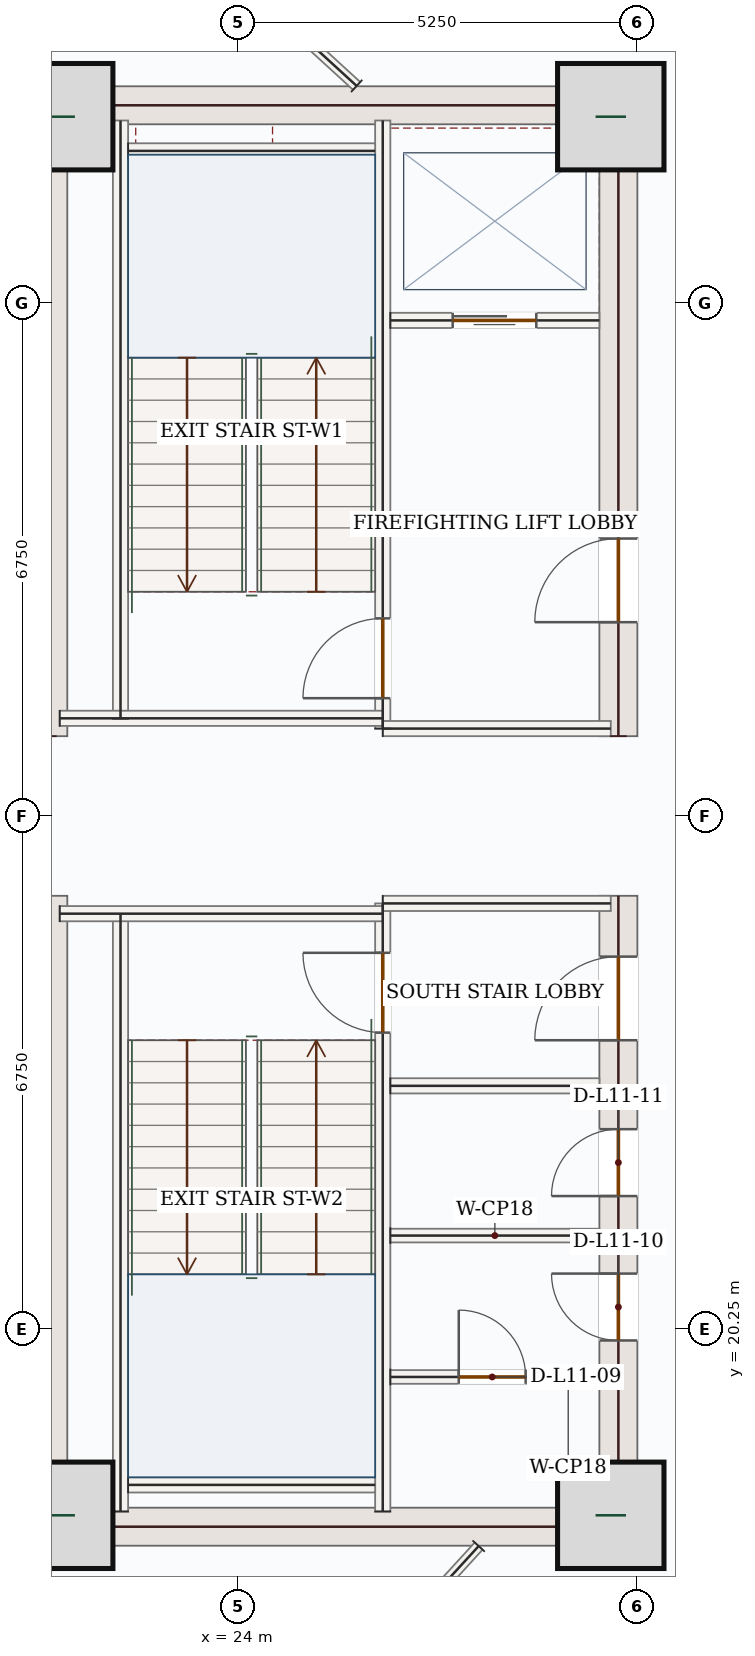
"""IFC4 building model, lengths in metres.
Left out: names, types, materials, properties, quantities, classifications, styles, units other than length and angle.
Written with IfcOpenShell. Run it as: python <this file> out.ifc"""

import sys

from ifc_helpers import new_model, si_unit, direction, frame, frame_2d, origin, origin_2d, place, context, subcontext, project, spatial, rectangle, extrude, source, transform, mapped, element, fill, save


model = new_model("IFC4")
c1 = context("Model", 3, precision=1e-05, world=origin(), true_north=direction((0.0, 1.0)))
c2 = subcontext(c1, "Body", "Model", "MODEL_VIEW")
j1 = project(units=[si_unit("LENGTHUNIT", "METRE"), si_unit("PLANEANGLEUNIT", "RADIAN")], contexts=[c1])
p1 = place(None, origin())
s1 = spatial("IfcSite", under=j1, at=p1, CompositionType="ELEMENT")
p2 = place(p1, origin())
s2 = spatial("IfcBuilding", under=s1, at=p2, CompositionType="ELEMENT")
p3 = place(p2, frame((0.0, 0.0, 54.3)))
s3 = spatial("IfcBuildingStorey", under=s2, at=p3, CompositionType="ELEMENT", Elevation=54.3)
m1 = source(origin(), c2, "Body", "SweptSolid", [
    extrude(rectangle(XDim=8.55, YDim=0.5, at=frame_2d((4.275, 0.0))), origin(), (0.0, 0.0, 1.0), 3.95),
])
for number, where, z_axis, x_axis in (
    (1, (21.5, 17.4, 0.0), (0.0, 0.0, 1.0), (0.0, 1.0, 0.0)),
    (2, (21.5, 28.05, 0.0), (0.0, 0.0, 1.0), (0.0, 1.0, 0.0)),
):
    element("IfcWall", number, at=place(p3, frame(where, z_axis=z_axis, x_axis=x_axis)), inside=s3, PredefinedType="SHEAR", context=c2, shape_type="MappedRepresentation", body=[
        mapped(m1, transform((0.0, 0.0, 0.0), x_axis=(1.0, 0.0, 0.0), y_axis=(0.0, 1.0, 0.0), z_axis=(0.0, 0.0, 1.0), scale=1.0)),
    ])
p4 = place(p3, frame((29.0, 17.4, 0.0), z_axis=(0.0, 0.0, 1.0), x_axis=(0.0, 1.0, 0.0)))
e3 = element("IfcWall", 3, at=p4, inside=s3, PredefinedType="SHEAR", context=c2, shape_type="SweptSolid", body=[
    extrude(rectangle(XDim=8.55, YDim=0.5, at=frame_2d((4.275, 0.0))), origin(), (0.0, 0.0, 1.0), 3.95),
])
p5 = place(p4, frame((6.65, 0.0, 0.0)))
e4 = element("IfcOpeningElement", 4, at=p5, cuts=e3, PredefinedType="OPENING", context=c2, shape_type="SweptSolid", body=[
    extrude(rectangle(XDim=1.1, YDim=2.2, at=frame_2d((0.55, 1.1))), frame((0.0, 0.26, 0.0), z_axis=(0.0, -1.0, 0.0), x_axis=(1.0, 0.0, 0.0)), (0.0, 0.0, 1.0), 0.52),
])
p6 = place(p4, frame((2.7, 0.0, 0.0)))
e5 = element("IfcOpeningElement", 5, at=p6, cuts=e3, PredefinedType="OPENING", context=c2, shape_type="SweptSolid", body=[
    extrude(rectangle(XDim=0.88, YDim=2.1, at=frame_2d((0.44, 1.05))), frame((0.0, 0.26, 0.0), z_axis=(0.0, -1.0, 0.0), x_axis=(1.0, 0.0, 0.0)), (0.0, 0.0, 1.0), 0.52),
])
p7 = place(p4, frame((4.6, 0.0, 0.0)))
e6 = element("IfcOpeningElement", 6, at=p7, cuts=e3, PredefinedType="OPENING", context=c2, shape_type="SweptSolid", body=[
    extrude(rectangle(XDim=0.88, YDim=2.1, at=frame_2d((0.44, 1.05))), frame((0.0, 0.26, 0.0), z_axis=(0.0, -1.0, 0.0), x_axis=(1.0, 0.0, 0.0)), (0.0, 0.0, 1.0), 0.52),
])
p8 = place(p3, frame((29.0, 28.05, 0.0), z_axis=(0.0, 0.0, 1.0), x_axis=(0.0, 1.0, 0.0)))
e7 = element("IfcWall", 7, at=p8, inside=s3, PredefinedType="SHEAR", context=c2, shape_type="SweptSolid", body=[
    extrude(rectangle(XDim=8.55, YDim=0.5, at=frame_2d((4.275, 0.0))), origin(), (0.0, 0.0, 1.0), 3.95),
])
p9 = place(p8, frame((1.5, 0.0, 0.0)))
e8 = element("IfcOpeningElement", 8, at=p9, cuts=e7, PredefinedType="OPENING", context=c2, shape_type="SweptSolid", body=[
    extrude(rectangle(XDim=1.1, YDim=2.2, at=frame_2d((0.55, 1.1))), frame((0.0, 0.26, 0.0), z_axis=(0.0, -1.0, 0.0), x_axis=(1.0, 0.0, 0.0)), (0.0, 0.0, 1.0), 0.52),
])
m2 = source(origin(), c2, "Body", "SweptSolid", [
    extrude(rectangle(XDim=7.0, YDim=0.5, at=frame_2d((3.5, 0.0))), origin(), (0.0, 0.0, 1.0), 3.95),
])
for number, where, z_axis, x_axis in (
    (9, (21.75, 17.65, 0.0), (0.0, 0.0, 1.0), (1.0, 0.0, 0.0)),
    (10, (21.75, 36.35, 0.0), (0.0, 0.0, 1.0), (1.0, 0.0, 0.0)),
):
    element("IfcWall", number, at=place(p3, frame(where, z_axis=z_axis, x_axis=x_axis)), inside=s3, PredefinedType="SHEAR", context=c2, shape_type="MappedRepresentation", body=[
        mapped(m2, transform((0.0, 0.0, 0.0), x_axis=(1.0, 0.0, 0.0), y_axis=(0.0, 1.0, 0.0), z_axis=(0.0, 0.0, 1.0), scale=1.0)),
    ])
m3 = source(origin(), c2, "Body", "SweptSolid", [
    extrude(rectangle(XDim=1.4, YDim=1.4, at=origin_2d()), origin(), (0.0, 0.0, 1.0), 4.2),
])
for number, where, z_axis, x_axis in (
    (11, (21.65, 17.8, 0.0), (0.0, 0.0, 1.0), (1.0, 0.0, 0.0)),
    (12, (28.9, 17.8, 0.0), (0.0, 0.0, 1.0), (1.0, 0.0, 0.0)),
    (13, (21.65, 36.2, 0.0), (0.0, 0.0, 1.0), (1.0, 0.0, 0.0)),
    (14, (28.9, 36.2, 0.0), (0.0, 0.0, 1.0), (1.0, 0.0, 0.0)),
):
    element("IfcColumn", number, at=place(p3, frame(where, z_axis=z_axis, x_axis=x_axis)), inside=s3, PredefinedType="COLUMN", context=c2, shape_type="MappedRepresentation", body=[
        mapped(m3, transform((0.0, 0.0, 0.0), x_axis=(1.0, 0.0, 0.0), y_axis=(0.0, 1.0, 0.0), z_axis=(0.0, 0.0, 1.0), scale=1.0)),
    ])
p10 = place(p3, frame((22.658, 14.74, 0.0), z_axis=(0.0, 0.0, 1.0), x_axis=(-0.707106781187, 0.707106781187, 0.0)))
e15 = element("IfcWall", 15, at=p10, inside=s3, PredefinedType="SOLIDWALL", context=c2, shape_type="SweptSolid", body=[
    extrude(rectangle(XDim=5.258, YDim=0.32, at=frame_2d((2.629, 0.0))), origin(), (0.0, 0.0, 1.0), 3.95),
])
p11 = place(p10, frame((1.429, 0.0, 0.85)))
e16 = element("IfcOpeningElement", 16, at=p11, cuts=e15, PredefinedType="OPENING", context=c2, shape_type="SweptSolid", body=[
    extrude(rectangle(XDim=2.4, YDim=1.8, at=frame_2d((1.2, 0.9))), frame((0.0, 0.17, 0.0), z_axis=(0.0, -1.0, 0.0), x_axis=(1.0, 0.0, 0.0)), (0.0, 0.0, 1.0), 0.34),
])
m4 = source(origin(), c2, "Body", "SweptSolid", [
    extrude(rectangle(XDim=5.258, YDim=0.32, at=frame_2d((2.629, 0.0))), origin(), (0.0, 0.0, 1.0), 3.95),
])
p12 = place(p3, frame((18.94, 35.542, 0.0), z_axis=(0.0, 0.0, 1.0), x_axis=(0.707106781187, 0.707106781187, 0.0)))
e17 = element("IfcWall", 17, at=p12, inside=s3, PredefinedType="SOLIDWALL", context=c2, shape_type="MappedRepresentation", body=[
    mapped(m4, transform((0.0, 0.0, 0.0), x_axis=(1.0, 0.0, 0.0), y_axis=(0.0, 1.0, 0.0), z_axis=(0.0, 0.0, 1.0), scale=1.0)),
])
m5 = source(origin(), c2, "Body", "SweptSolid", [
    extrude(rectangle(XDim=7.87, YDim=0.2, at=frame_2d((3.935, 0.0))), origin(), (0.0, 0.0, 1.0), 3.95),
])
for number, where, z_axis, x_axis in (
    (18, (22.45, 17.85, 0.0), (0.0, 0.0, 1.0), (0.0, 1.0, 0.0)),
    (19, (22.45, 28.28, 0.0), (0.0, 0.0, 1.0), (0.0, 1.0, 0.0)),
):
    element("IfcWall", number, at=place(p3, frame(where, z_axis=z_axis, x_axis=x_axis)), inside=s3, PredefinedType="SOLIDWALL", context=c2, shape_type="MappedRepresentation", body=[
        mapped(m5, transform((0.0, 0.0, 0.0), x_axis=(1.0, 0.0, 0.0), y_axis=(0.0, 1.0, 0.0), z_axis=(0.0, 0.0, 1.0), scale=1.0)),
    ])
p13 = place(p3, frame((25.9, 17.85, 0.0), z_axis=(0.0, 0.0, 1.0), x_axis=(0.0, 1.0, 0.0)))
e20 = element("IfcWall", 20, at=p13, inside=s3, PredefinedType="SOLIDWALL", context=c2, shape_type="SweptSolid", body=[
    extrude(rectangle(XDim=8.0, YDim=0.2, at=frame_2d((4.0, 0.0))), origin(), (0.0, 0.0, 1.0), 3.95),
])
p14 = place(p13, frame((6.3, 0.0, 0.0)))
e21 = element("IfcOpeningElement", 21, at=p14, cuts=e20, PredefinedType="OPENING", context=c2, shape_type="SweptSolid", body=[
    extrude(rectangle(XDim=1.05, YDim=2.15, at=frame_2d((0.525, 1.075))), frame((0.0, 0.11, 0.0), z_axis=(0.0, -1.0, 0.0), x_axis=(1.0, 0.0, 0.0)), (0.0, 0.0, 1.0), 0.22),
])
p15 = place(p3, frame((25.9, 28.15, 0.0), z_axis=(0.0, 0.0, 1.0), x_axis=(0.0, 1.0, 0.0)))
e22 = element("IfcWall", 22, at=p15, inside=s3, PredefinedType="SOLIDWALL", context=c2, shape_type="SweptSolid", body=[
    extrude(rectangle(XDim=8.0, YDim=0.2, at=frame_2d((4.0, 0.0))), origin(), (0.0, 0.0, 1.0), 3.95),
])
p16 = place(p15, frame((0.4, 0.0, 0.0)))
e23 = element("IfcOpeningElement", 23, at=p16, cuts=e22, PredefinedType="OPENING", context=c2, shape_type="SweptSolid", body=[
    extrude(rectangle(XDim=1.05, YDim=2.15, at=frame_2d((0.525, 1.075))), frame((0.0, 0.11, 0.0), z_axis=(0.0, -1.0, 0.0), x_axis=(1.0, 0.0, 0.0)), (0.0, 0.0, 1.0), 0.22),
])
m6 = source(origin(), c2, "Body", "SweptSolid", [
    extrude(rectangle(XDim=4.25, YDim=0.2, at=frame_2d((2.125, 0.0))), origin(), (0.0, 0.0, 1.0), 3.95),
])
p17 = place(p3, frame((21.65, 25.715, 0.0), z_axis=(0.0, 0.0, 1.0), x_axis=(1.0, 0.0, 0.0)))
e24 = element("IfcWall", 24, at=p17, inside=s3, PredefinedType="SOLIDWALL", context=c2, shape_type="MappedRepresentation", body=[
    mapped(m6, transform((0.0, 0.0, 0.0), x_axis=(1.0, 0.0, 0.0), y_axis=(0.0, 1.0, 0.0), z_axis=(0.0, 0.0, 1.0), scale=1.0)),
])
m7 = source(origin(), c2, "Body", "SweptSolid", [
    extrude(rectangle(XDim=3.0, YDim=0.2, at=frame_2d((1.5, 0.0))), origin(), (0.0, 0.0, 1.0), 3.95),
])
p18 = place(p3, frame((25.9, 25.85, 0.0), z_axis=(0.0, 0.0, 1.0), x_axis=(1.0, 0.0, 0.0)))
e25 = element("IfcWall", 25, at=p18, inside=s3, PredefinedType="SOLIDWALL", context=c2, shape_type="MappedRepresentation", body=[
    mapped(m7, transform((0.0, 0.0, 0.0), x_axis=(1.0, 0.0, 0.0), y_axis=(0.0, 1.0, 0.0), z_axis=(0.0, 0.0, 1.0), scale=1.0)),
])
p19 = place(p3, frame((21.65, 28.285, 0.0), z_axis=(0.0, 0.0, 1.0), x_axis=(1.0, 0.0, 0.0)))
e26 = element("IfcWall", 26, at=p19, inside=s3, PredefinedType="SOLIDWALL", context=c2, shape_type="MappedRepresentation", body=[
    mapped(m6, transform((0.0, 0.0, 0.0), x_axis=(1.0, 0.0, 0.0), y_axis=(0.0, 1.0, 0.0), z_axis=(0.0, 0.0, 1.0), scale=1.0)),
])
p20 = place(p3, frame((25.9, 28.15, 0.0), z_axis=(0.0, 0.0, 1.0), x_axis=(1.0, 0.0, 0.0)))
e27 = element("IfcWall", 27, at=p20, inside=s3, PredefinedType="SOLIDWALL", context=c2, shape_type="MappedRepresentation", body=[
    mapped(m7, transform((0.0, 0.0, 0.0), x_axis=(1.0, 0.0, 0.0), y_axis=(0.0, 1.0, 0.0), z_axis=(0.0, 0.0, 1.0), scale=1.0)),
])
m8 = source(origin(), c2, "Body", "SweptSolid", [
    extrude(rectangle(XDim=3.25, YDim=0.2, at=frame_2d((1.625, 0.0))), origin(), (0.0, 0.0, 1.0), 3.95),
])
for number, where, z_axis, x_axis in (
    (28, (22.55, 35.75, 0.0), (0.0, 0.0, 1.0), (1.0, 0.0, 0.0)),
    (29, (22.55, 18.2, 0.0), (0.0, 0.0, 1.0), (1.0, 0.0, 0.0)),
):
    element("IfcWall", number, at=place(p3, frame(where, z_axis=z_axis, x_axis=x_axis)), inside=s3, PredefinedType="SOLIDWALL", context=c2, shape_type="MappedRepresentation", body=[
        mapped(m8, transform((0.0, 0.0, 0.0), x_axis=(1.0, 0.0, 0.0), y_axis=(0.0, 1.0, 0.0), z_axis=(0.0, 0.0, 1.0), scale=1.0)),
    ])
p21 = place(p3, frame((26.0, 33.52, 0.0), z_axis=(0.0, 0.0, 1.0), x_axis=(1.0, 0.0, 0.0)))
e30 = element("IfcWall", 30, at=p21, inside=s3, PredefinedType="SOLIDWALL", context=c2, shape_type="SweptSolid", body=[
    extrude(rectangle(XDim=2.75, YDim=0.2, at=frame_2d((1.375, 0.0))), origin(), (0.0, 0.0, 1.0), 3.95),
])
p22 = place(p21, frame((0.82, 0.0, 0.0)))
e31 = element("IfcOpeningElement", 31, at=p22, cuts=e30, PredefinedType="OPENING", context=c2, shape_type="SweptSolid", body=[
    extrude(rectangle(XDim=1.1, YDim=2.15, at=frame_2d((0.55, 1.075))), frame((0.0, 0.11, 0.0), z_axis=(0.0, -1.0, 0.0), x_axis=(1.0, 0.0, 0.0)), (0.0, 0.0, 1.0), 0.22),
])
m9 = source(origin(), c2, "Body", "SweptSolid", [
    extrude(rectangle(XDim=2.75, YDim=0.2, at=frame_2d((1.375, 0.0))), origin(), (0.0, 0.0, 1.0), 3.95),
])
p23 = place(p3, frame((26.0, 23.45, 0.0), z_axis=(0.0, 0.0, 1.0), x_axis=(1.0, 0.0, 0.0)))
e32 = element("IfcWall", 32, at=p23, inside=s3, PredefinedType="SOLIDWALL", context=c2, shape_type="MappedRepresentation", body=[
    mapped(m9, transform((0.0, 0.0, 0.0), x_axis=(1.0, 0.0, 0.0), y_axis=(0.0, 1.0, 0.0), z_axis=(0.0, 0.0, 1.0), scale=1.0)),
])
p24 = place(p3, frame((26.0, 19.62, 0.0), z_axis=(0.0, 0.0, 1.0), x_axis=(1.0, 0.0, 0.0)))
e33 = element("IfcWall", 33, at=p24, inside=s3, PredefinedType="PARTITIONING", context=c2, shape_type="SweptSolid", body=[
    extrude(rectangle(XDim=2.75, YDim=0.18, at=frame_2d((1.375, 0.0))), origin(), (0.0, 0.0, 1.0), 3.95),
])
p25 = place(p24, frame((0.9, 0.0, 0.0)))
e34 = element("IfcOpeningElement", 34, at=p25, cuts=e33, PredefinedType="OPENING", context=c2, shape_type="SweptSolid", body=[
    extrude(rectangle(XDim=0.88, YDim=2.1, at=frame_2d((0.44, 1.05))), frame((0.0, 0.1, 0.0), z_axis=(0.0, -1.0, 0.0), x_axis=(1.0, 0.0, 0.0)), (0.0, 0.0, 1.0), 0.2),
])
m10 = source(origin(), c2, "Body", "SweptSolid", [
    extrude(rectangle(XDim=2.75, YDim=0.18, at=frame_2d((1.375, 0.0))), origin(), (0.0, 0.0, 1.0), 3.95),
])
p26 = place(p3, frame((26.0, 21.48, 0.0), z_axis=(0.0, 0.0, 1.0), x_axis=(1.0, 0.0, 0.0)))
e35 = element("IfcWall", 35, at=p26, inside=s3, PredefinedType="PARTITIONING", context=c2, shape_type="MappedRepresentation", body=[
    mapped(m10, transform((0.0, 0.0, 0.0), x_axis=(1.0, 0.0, 0.0), y_axis=(0.0, 1.0, 0.0), z_axis=(0.0, 0.0, 1.0), scale=1.0)),
])
m11 = source(origin(), c2, "Body", "SweptSolid", [
    extrude(rectangle(XDim=3.689, YDim=0.14, at=frame_2d((1.844, 0.0))), origin(), (0.0, 0.0, 1.0), 3.95),
])
p27 = place(p3, frame((25.557, 36.605, 0.0), z_axis=(0.0, 0.0, 1.0), x_axis=(-0.737843279395, 0.674972069831, 0.0)))
e36 = element("IfcWall", 36, at=p27, inside=s3, PredefinedType="PARTITIONING", context=c2, shape_type="MappedRepresentation", body=[
    mapped(m11, transform((0.0, 0.0, 0.0), x_axis=(1.0, 0.0, 0.0), y_axis=(0.0, 1.0, 0.0), z_axis=(0.0, 0.0, 1.0), scale=1.0)),
])
m12 = source(origin(), c2, "Body", "SweptSolid", [
    extrude(rectangle(XDim=3.375, YDim=0.14, at=frame_2d((1.688, 0.0))), origin(), (0.0, 0.0, 1.0), 3.95),
])
p28 = place(p3, frame((27.162, 17.395, 0.0), z_axis=(0.0, 0.0, 1.0), x_axis=(-0.674974079893, -0.737841440604, 0.0)))
e37 = element("IfcWall", 37, at=p28, inside=s3, PredefinedType="PARTITIONING", context=c2, shape_type="MappedRepresentation", body=[
    mapped(m12, transform((0.0, 0.0, 0.0), x_axis=(1.0, 0.0, 0.0), y_axis=(0.0, 1.0, 0.0), z_axis=(0.0, 0.0, 1.0), scale=1.0)),
])
m13 = source(origin(), c2, "Body", "SweptSolid", [
    extrude(rectangle(XDim=2.4, YDim=1.8, at=frame_2d((1.2, 0.9))), frame((0.0, 0.03, 0.0), z_axis=(0.0, -1.0, 0.0), x_axis=(1.0, 0.0, 0.0)), (0.0, 0.0, 1.0), 0.06),
])
p29 = place(p11, origin())
e38 = element("IfcWindow", 38, at=p29, inside=s3, PartitioningType="DOUBLE_PANEL_VERTICAL", PredefinedType="WINDOW", context=c2, shape_type="MappedRepresentation", body=[
    mapped(m13, transform((0.0, 0.0, 0.0), x_axis=(1.0, 0.0, 0.0), y_axis=(0.0, 1.0, 0.0), z_axis=(0.0, 0.0, 1.0), scale=1.0)),
])
fill(e16, e38)
m14 = source(origin(), c2, "Body", "SweptSolid", [
    extrude(rectangle(XDim=1.05, YDim=2.15, at=frame_2d((0.525, 1.075))), frame((0.0, 0.025, 0.0), z_axis=(0.0, -1.0, 0.0), x_axis=(1.0, 0.0, 0.0)), (0.0, 0.0, 1.0), 0.05),
])
p30 = place(p16, origin())
e39 = element("IfcDoor", 39, at=p30, inside=s3, OperationType="SINGLE_SWING_LEFT", PredefinedType="DOOR", context=c2, shape_type="MappedRepresentation", body=[
    mapped(m14, transform((0.0, 0.0, 0.0), x_axis=(1.0, 0.0, 0.0), y_axis=(0.0, 1.0, 0.0), z_axis=(0.0, 0.0, 1.0), scale=1.0)),
])
fill(e23, e39)
p31 = place(p14, origin())
e40 = element("IfcDoor", 40, at=p31, inside=s3, OperationType="SINGLE_SWING_RIGHT", PredefinedType="DOOR", context=c2, shape_type="MappedRepresentation", body=[
    mapped(m14, transform((0.0, 0.0, 0.0), x_axis=(1.0, 0.0, 0.0), y_axis=(0.0, 1.0, 0.0), z_axis=(0.0, 0.0, 1.0), scale=1.0)),
])
fill(e21, e40)
m15 = source(origin(), c2, "Body", "SweptSolid", [
    extrude(rectangle(XDim=1.1, YDim=2.15, at=frame_2d((0.55, 1.075))), frame((0.0, 0.025, 0.0), z_axis=(0.0, -1.0, 0.0), x_axis=(1.0, 0.0, 0.0)), (0.0, 0.0, 1.0), 0.05),
])
p32 = place(p22, origin())
e41 = element("IfcDoor", 41, at=p32, inside=s3, OperationType="DOUBLE_DOOR_SLIDING", PredefinedType="DOOR", context=c2, shape_type="MappedRepresentation", body=[
    mapped(m15, transform((0.0, 0.0, 0.0), x_axis=(1.0, 0.0, 0.0), y_axis=(0.0, 1.0, 0.0), z_axis=(0.0, 0.0, 1.0), scale=1.0)),
])
fill(e31, e41)
m16 = source(origin(), c2, "Body", "SweptSolid", [
    extrude(rectangle(XDim=1.1, YDim=2.2, at=frame_2d((0.55, 1.1))), frame((0.0, 0.025, 0.0), z_axis=(0.0, -1.0, 0.0), x_axis=(1.0, 0.0, 0.0)), (0.0, 0.0, 1.0), 0.05),
])
p33 = place(p9, origin())
e42 = element("IfcDoor", 42, at=p33, inside=s3, OperationType="SINGLE_SWING_LEFT", PredefinedType="DOOR", context=c2, shape_type="MappedRepresentation", body=[
    mapped(m16, transform((0.0, 0.0, 0.0), x_axis=(1.0, 0.0, 0.0), y_axis=(0.0, 1.0, 0.0), z_axis=(0.0, 0.0, 1.0), scale=1.0)),
])
fill(e8, e42)
p34 = place(p5, origin())
e43 = element("IfcDoor", 43, at=p34, inside=s3, OperationType="SINGLE_SWING_LEFT", PredefinedType="DOOR", context=c2, shape_type="MappedRepresentation", body=[
    mapped(m16, transform((0.0, 0.0, 0.0), x_axis=(1.0, 0.0, 0.0), y_axis=(0.0, 1.0, 0.0), z_axis=(0.0, 0.0, 1.0), scale=1.0)),
])
fill(e4, e43)
m17 = source(origin(), c2, "Body", "SweptSolid", [
    extrude(rectangle(XDim=0.88, YDim=2.1, at=frame_2d((0.44, 1.05))), frame((0.0, 0.025, 0.0), z_axis=(0.0, -1.0, 0.0), x_axis=(1.0, 0.0, 0.0)), (0.0, 0.0, 1.0), 0.05),
])
p35 = place(p25, origin())
e44 = element("IfcDoor", 44, at=p35, inside=s3, OperationType="SINGLE_SWING_LEFT", PredefinedType="DOOR", context=c2, shape_type="MappedRepresentation", body=[
    mapped(m17, transform((0.0, 0.0, 0.0), x_axis=(1.0, 0.0, 0.0), y_axis=(0.0, 1.0, 0.0), z_axis=(0.0, 0.0, 1.0), scale=1.0)),
])
fill(e34, e44)
p36 = place(p6, origin())
e45 = element("IfcDoor", 45, at=p36, inside=s3, OperationType="SINGLE_SWING_RIGHT", PredefinedType="DOOR", context=c2, shape_type="MappedRepresentation", body=[
    mapped(m17, transform((0.0, 0.0, 0.0), x_axis=(1.0, 0.0, 0.0), y_axis=(0.0, 1.0, 0.0), z_axis=(0.0, 0.0, 1.0), scale=1.0)),
])
fill(e5, e45)
p37 = place(p7, origin())
e46 = element("IfcDoor", 46, at=p37, inside=s3, OperationType="SINGLE_SWING_LEFT", PredefinedType="DOOR", context=c2, shape_type="MappedRepresentation", body=[
    mapped(m17, transform((0.0, 0.0, 0.0), x_axis=(1.0, 0.0, 0.0), y_axis=(0.0, 1.0, 0.0), z_axis=(0.0, 0.0, 1.0), scale=1.0)),
])
fill(e6, e46)
save(model, sys.argv[1])
